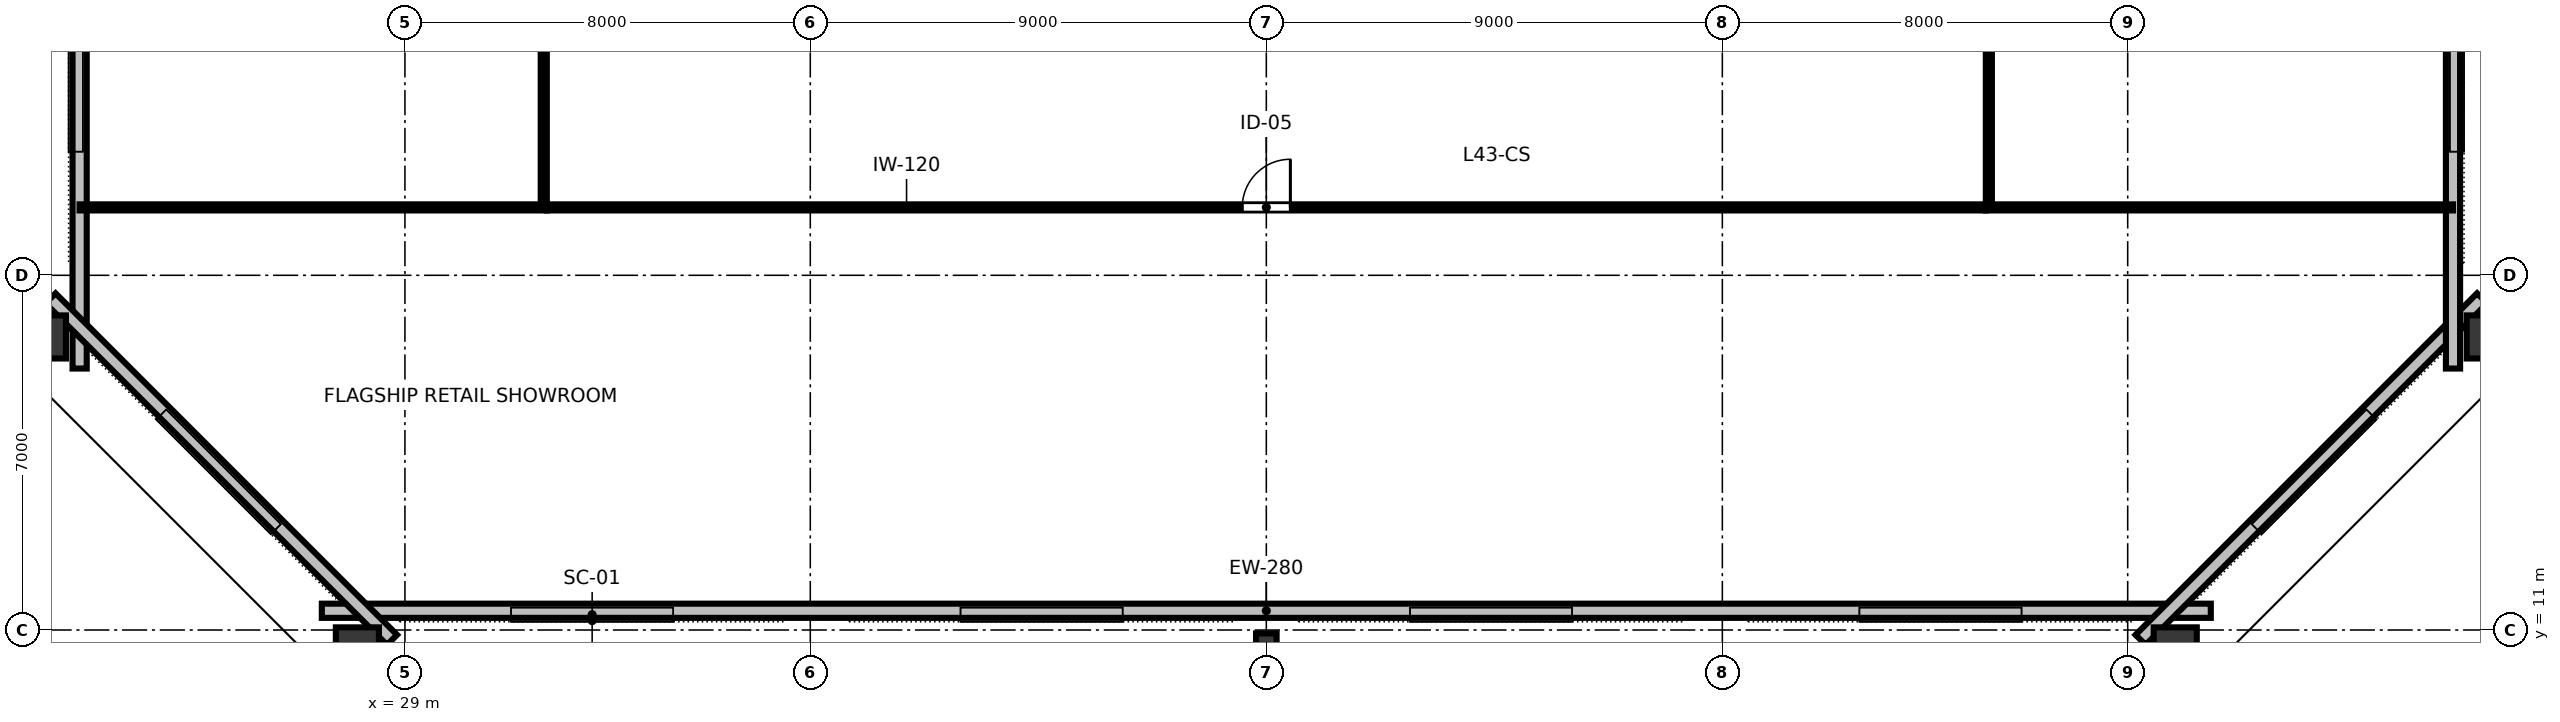
"""IFC4 building model, lengths in metres.
Left out: names, types, materials, properties, quantities, classifications, styles, units other than length and angle.
Written with IfcOpenShell. Run it as: python <this file> out.ifc"""

import sys

from ifc_helpers import new_model, si_unit, direction, frame, frame_2d, origin, origin_2d, place, context, subcontext, project, spatial, rectangle, hollow_rectangle, i_section, extrude, element, fill, save


model = new_model("IFC4")
c1 = context("Model", 3, precision=1e-05, world=origin(), true_north=direction((0.0, 1.0)))
c2 = subcontext(c1, "Body", "Model", "MODEL_VIEW")
j1 = project(units=[si_unit("LENGTHUNIT", "METRE"), si_unit("PLANEANGLEUNIT", "RADIAN")], contexts=[c1])
p1 = place(None, origin())
s1 = spatial("IfcSite", under=j1, at=p1, CompositionType="ELEMENT")
p2 = place(p1, origin())
s2 = spatial("IfcBuilding", under=s1, at=p2, CompositionType="ELEMENT")
p3 = place(p2, frame((0.0, 0.0, 163.6)))
s3 = spatial("IfcBuildingStorey", under=s2, at=p3, CompositionType="ELEMENT", Elevation=163.6)
p4 = place(p3, frame((28.062, 10.552, 0.0), z_axis=(0.177459869766, 0.131769219711, 0.975266562207), x_axis=(-0.596154567715, 0.802869685187, 0.0)))
e1 = element("IfcColumn", 1, at=p4, inside=s3, PredefinedType="COLUMN", context=c2, shape_type="SweptSolid", body=[
    extrude(hollow_rectangle(XDim=0.85, YDim=1.0, WallThickness=0.05, at=origin_2d()), origin(), (0.0, 0.0, 1.0), 3.361),
])
p5 = place(p3, frame((46.0, 10.72, 0.0), z_axis=(0.0, 0.133024371067, 0.991112766895), x_axis=(-1.0, 0.0, 0.0)))
e2 = element("IfcColumn", 2, at=p5, inside=s3, PredefinedType="COLUMN", context=c2, shape_type="SweptSolid", body=[
    extrude(i_section(OverallWidth=0.406, OverallDepth=0.425, WebThickness=0.033, FlangeThickness=0.052, FilletRadius=0.025, at=origin_2d()), origin(), (0.0, 0.0, 1.0), 3.307),
])
p6 = place(p3, frame((63.938, 10.552, 0.0), z_axis=(-0.177459869766, 0.131769219711, 0.975266562207), x_axis=(-0.596154567715, -0.802869685187, 0.0)))
e3 = element("IfcColumn", 3, at=p6, inside=s3, PredefinedType="COLUMN", context=c2, shape_type="SweptSolid", body=[
    extrude(hollow_rectangle(XDim=0.85, YDim=1.0, WallThickness=0.05, at=origin_2d()), origin(), (0.0, 0.0, 1.0), 3.361),
])
for number, where, z_axis, x_axis in (
    (4, (70.19, 16.783, 0.0), (-0.155, 0.154, 0.976), (0.694, -0.686, 0.219)),
    (5, (21.81, 16.783, 0.0), (0.155, 0.154, 0.976), (-0.694, -0.686, 0.219)),
):
    element("IfcColumn", number, at=place(p3, frame(where, z_axis=z_axis, x_axis=x_axis)), inside=s3, PredefinedType="COLUMN", context=c2, shape_type="SweptSolid", body=[
        extrude(hollow_rectangle(XDim=0.85, YDim=1.0, WallThickness=0.05, at=origin_2d()), origin(), (0.0, 0.0, 1.0), 3.359),
    ])
p7 = place(p3, frame((27.36, 11.38, 0.0), z_axis=(0.0, 0.0, 1.0), x_axis=(1.0, 0.0, 0.0)))
e6 = element("IfcWall", 6, at=p7, inside=s3, PredefinedType="STANDARD", context=c2, shape_type="SweptSolid", body=[
    extrude(rectangle(XDim=37.28, YDim=0.28, at=frame_2d((18.64, 0.0))), origin(), (0.0, 0.0, 1.0), 2.343),
])
p8 = place(p3, frame((63.254, 10.806, 0.0), z_axis=(0.0, 0.0, 1.0), x_axis=(0.707119588888, 0.707093973253, 0.0)))
e7 = element("IfcWall", 7, at=p8, inside=s3, PredefinedType="STANDARD", context=c2, shape_type="SweptSolid", body=[
    extrude(rectangle(XDim=9.531, YDim=0.28, at=frame_2d((4.766, 0.0))), origin(), (0.0, 0.0, 1.0), 2.343),
])
p9 = place(p3, frame((69.42, 16.16, 0.0), z_axis=(0.0, 0.0, 1.0), x_axis=(0.0, 1.0, 0.0)))
e8 = element("IfcWall", 8, at=p9, inside=s3, PredefinedType="STANDARD", context=c2, shape_type="SweptSolid", body=[
    extrude(rectangle(XDim=31.68, YDim=0.28, at=frame_2d((15.84, 0.0))), origin(), (0.0, 0.0, 1.0), 2.151),
])
p10 = place(p3, frame((22.58, 47.84, 0.0), z_axis=(0.0, 0.0, 1.0), x_axis=(0.0, -1.0, 0.0)))
e9 = element("IfcWall", 9, at=p10, inside=s3, PredefinedType="STANDARD", context=c2, shape_type="SweptSolid", body=[
    extrude(rectangle(XDim=31.68, YDim=0.28, at=frame_2d((15.84, 0.0))), origin(), (0.0, 0.0, 1.0), 2.343),
])
p11 = place(p3, frame((22.006, 17.545, 0.0), z_axis=(0.0, 0.0, 1.0), x_axis=(0.707119588888, -0.707093973253, 0.0)))
e10 = element("IfcWall", 10, at=p11, inside=s3, PredefinedType="STANDARD", context=c2, shape_type="SweptSolid", body=[
    extrude(rectangle(XDim=9.531, YDim=0.28, at=frame_2d((4.766, 0.0))), origin(), (0.0, 0.0, 1.0), 2.343),
])
p12 = place(p3, frame((31.8, 19.34, 0.0), z_axis=(0.0, 0.0, 1.0), x_axis=(1.0, 0.0, 0.0)))
e11 = element("IfcWall", 11, at=p12, inside=s3, PredefinedType="PARTITIONING", context=c2, shape_type="SweptSolid", body=[
    extrude(rectangle(XDim=28.4, YDim=0.12, at=frame_2d((14.2, 0.0))), origin(), (0.0, 0.0, 1.0), 2.56),
])
p13 = place(p12, frame((13.725, 0.0, 0.0)))
e12 = element("IfcOpeningElement", 12, at=p13, cuts=e11, PredefinedType="OPENING", context=c2, shape_type="SweptSolid", body=[
    extrude(rectangle(XDim=0.95, YDim=2.15, at=frame_2d((0.475, 1.075))), frame((0.0, 0.07, 0.0), z_axis=(0.0, -1.0, 0.0), x_axis=(1.0, 0.0, 0.0)), (0.0, 0.0, 1.0), 0.14),
])
p14 = place(p3, frame((31.74, 19.4, 0.0), z_axis=(0.0, 0.0, 1.0), x_axis=(0.0, 1.0, 0.0)))
e13 = element("IfcWall", 13, at=p14, inside=s3, PredefinedType="PARTITIONING", context=c2, shape_type="SweptSolid", body=[
    extrude(rectangle(XDim=11.58, YDim=0.12, at=frame_2d((5.79, 0.0))), origin(), (0.0, 0.0, 1.0), 2.56),
])
p15 = place(p14, frame((5.415, 0.0, 0.0)))
e14 = element("IfcOpeningElement", 14, at=p15, cuts=e13, PredefinedType="OPENING", context=c2, shape_type="SweptSolid", body=[
    extrude(rectangle(XDim=0.95, YDim=2.15, at=frame_2d((0.475, 1.075))), frame((0.0, 0.07, 0.0), z_axis=(0.0, -1.0, 0.0), x_axis=(1.0, 0.0, 0.0)), (0.0, 0.0, 1.0), 0.14),
])
p16 = place(p3, frame((60.26, 19.4, 0.0), z_axis=(0.0, 0.0, 1.0), x_axis=(0.0, 1.0, 0.0)))
e15 = element("IfcWall", 15, at=p16, inside=s3, PredefinedType="PARTITIONING", context=c2, shape_type="SweptSolid", body=[
    extrude(rectangle(XDim=11.58, YDim=0.12, at=frame_2d((5.79, 0.0))), origin(), (0.0, 0.0, 1.0), 2.56),
])
p17 = place(p16, frame((4.304, 0.0, 0.0)))
e16 = element("IfcOpeningElement", 16, at=p17, cuts=e15, PredefinedType="OPENING", context=c2, shape_type="SweptSolid", body=[
    extrude(rectangle(XDim=0.95, YDim=2.15, at=frame_2d((0.475, 1.075))), frame((0.0, 0.07, 0.0), z_axis=(0.0, -1.0, 0.0), x_axis=(1.0, 0.0, 0.0)), (0.0, 0.0, 1.0), 0.14),
])
p18 = place(p16, frame((9.994, 0.0, 0.0)))
e17 = element("IfcOpeningElement", 17, at=p18, cuts=e15, PredefinedType="OPENING", context=c2, shape_type="SweptSolid", body=[
    extrude(rectangle(XDim=0.95, YDim=2.15, at=frame_2d((0.475, 1.075))), frame((0.0, 0.07, 0.0), z_axis=(0.0, -1.0, 0.0), x_axis=(1.0, 0.0, 0.0)), (0.0, 0.0, 1.0), 0.14),
])
for number, where, z_axis, x_axis in (
    (18, (31.8, 19.34, 0.0), (0.0, 0.0, 1.0), (-1.0, 0.0, 0.0)),
    (19, (60.2, 19.34, 0.0), (0.0, 0.0, 1.0), (1.0, 0.0, 0.0)),
):
    element("IfcWall", number, at=place(p3, frame(where, z_axis=z_axis, x_axis=x_axis)), inside=s3, PredefinedType="PARTITIONING", context=c2, shape_type="SweptSolid", body=[
        extrude(rectangle(XDim=9.22, YDim=0.12, at=frame_2d((4.61, 0.0))), origin(), (0.0, 0.0, 1.0), 2.56),
    ])
p19 = place(p13, origin())
e20 = element("IfcDoor", 20, at=p19, inside=s3, OperationType="SINGLE_SWING_RIGHT", PredefinedType="DOOR", context=c2, shape_type="SweptSolid", body=[
    extrude(rectangle(XDim=0.95, YDim=2.15, at=frame_2d((0.475, 1.075))), frame((0.0, 0.025, 0.0), z_axis=(0.0, -1.0, 0.0), x_axis=(1.0, 0.0, 0.0)), (0.0, 0.0, 1.0), 0.05),
])
fill(e12, e20)
save(model, sys.argv[1])
